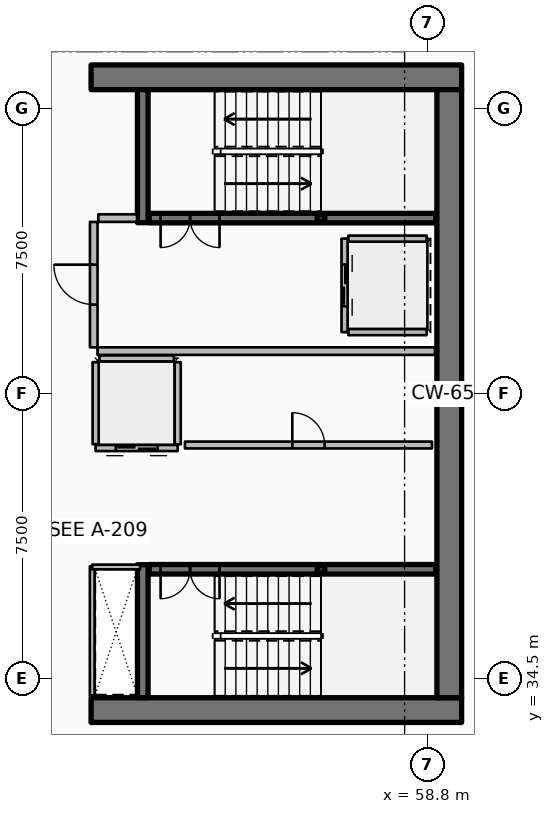
"""IFC4 building model, lengths in metres.
Left out: names, types, materials, properties, quantities, classifications, styles, units other than length and angle.
Written with IfcOpenShell. Run it as: python <this file> out.ifc"""

import sys

from ifc_helpers import new_model, si_unit, direction, frame, frame_2d, origin, origin_2d, place, context, subcontext, project, spatial, rectangle, hollow_rectangle, extrude, element, fill, save


model = new_model("IFC4")
c1 = context("Model", 3, precision=1e-05, world=origin(), true_north=direction((0.0, 1.0)))
c2 = subcontext(c1, "Body", "Model", "MODEL_VIEW")
j1 = project(units=[si_unit("LENGTHUNIT", "METRE"), si_unit("PLANEANGLEUNIT", "RADIAN")], contexts=[c1])
p1 = place(None, origin())
s1 = spatial("IfcSite", under=j1, at=p1, CompositionType="ELEMENT")
p2 = place(p1, origin())
s2 = spatial("IfcBuilding", under=s1, at=p2, CompositionType="ELEMENT")
p3 = place(p2, frame((0.0, 0.0, 214.05)))
s3 = spatial("IfcBuildingStorey", under=s2, at=p3, CompositionType="ELEMENT", Elevation=214.05)
for number, where, z_axis, x_axis in (
    (1, (49.95, 33.675, 0.0), (0.0, 0.0, 1.0), (1.0, 0.0, 0.0)),
    (2, (49.95, 50.325, 0.0), (0.0, 0.0, 1.0), (1.0, 0.0, 0.0)),
):
    element("IfcWall", number, at=place(p3, frame(where, z_axis=z_axis, x_axis=x_axis)), inside=s3, PredefinedType="SHEAR", context=c2, shape_type="SweptSolid", body=[
        extrude(rectangle(XDim=9.75, YDim=0.65, at=frame_2d((4.875, 0.0))), origin(), (0.0, 0.0, 1.0), 3.75),
    ])
p4 = place(p3, frame((59.375, 34.0, 0.0), z_axis=(0.0, 0.0, 1.0), x_axis=(0.0, 1.0, 0.0)))
e3 = element("IfcWall", 3, at=p4, inside=s3, PredefinedType="SHEAR", context=c2, shape_type="SweptSolid", body=[
    extrude(rectangle(XDim=16.0, YDim=0.65, at=frame_2d((8.0, 0.0))), origin(), (0.0, 0.0, 1.0), 3.75),
])
for number, where, z_axis, x_axis in (
    (4, (51.31, 46.5, 0.0), (0.0, 0.0, 1.0), (0.0, 1.0, 0.0)),
    (5, (51.31, 34.0, 0.0), (0.0, 0.0, 1.0), (0.0, 1.0, 0.0)),
):
    element("IfcWall", number, at=place(p3, frame(where, z_axis=z_axis, x_axis=x_axis)), inside=s3, PredefinedType="SHEAR", context=c2, shape_type="SweptSolid", body=[
        extrude(rectangle(XDim=3.5, YDim=0.28, at=frame_2d((1.75, 0.0))), origin(), (0.0, 0.0, 1.0), 3.75),
    ])
for number, where, z_axis, x_axis in (
    (6, (56.0, 46.62, 0.0), (0.0, 0.0, 1.0), (1.0, 0.0, 0.0)),
    (7, (56.0, 37.38, 0.0), (0.0, 0.0, 1.0), (1.0, 0.0, 0.0)),
):
    element("IfcColumn", number, at=place(p3, frame(where, z_axis=z_axis, x_axis=x_axis)), inside=s3, PredefinedType="COLUMN", context=c2, shape_type="SweptSolid", body=[
        extrude(hollow_rectangle(XDim=0.2, YDim=0.2, WallThickness=0.01, InnerFilletRadius=0.01, OuterFilletRadius=0.02, at=origin_2d()), origin(), (0.0, 0.0, 1.0), 1.67),
    ])
p5 = place(p3, frame((51.48, 46.62, 0.0), z_axis=(0.0, 0.0, 1.0), x_axis=(1.0, 0.0, 0.0)))
e8 = element("IfcWall", 8, at=p5, inside=s3, PredefinedType="SOLIDWALL", context=c2, shape_type="SweptSolid", body=[
    extrude(rectangle(XDim=7.54, YDim=0.25, at=frame_2d((3.77, 0.0))), origin(), (0.0, 0.0, 1.0), 3.5),
])
p6 = place(p5, frame((0.3, 0.0, 0.0)))
e9 = element("IfcOpeningElement", 9, at=p6, cuts=e8, PredefinedType="OPENING", context=c2, shape_type="SweptSolid", body=[
    extrude(rectangle(XDim=1.55, YDim=2.15, at=frame_2d((0.775, 1.075))), frame((0.0, 0.135, 0.0), z_axis=(0.0, -1.0, 0.0), x_axis=(1.0, 0.0, 0.0)), (0.0, 0.0, 1.0), 0.27),
])
p7 = place(p3, frame((51.48, 37.38, 0.0), z_axis=(0.0, 0.0, 1.0), x_axis=(1.0, 0.0, 0.0)))
e10 = element("IfcWall", 10, at=p7, inside=s3, PredefinedType="SOLIDWALL", context=c2, shape_type="SweptSolid", body=[
    extrude(rectangle(XDim=7.54, YDim=0.25, at=frame_2d((3.77, 0.0))), origin(), (0.0, 0.0, 1.0), 3.5),
])
p8 = place(p7, frame((0.3, 0.0, 0.0)))
e11 = element("IfcOpeningElement", 11, at=p8, cuts=e10, PredefinedType="OPENING", context=c2, shape_type="SweptSolid", body=[
    extrude(rectangle(XDim=1.55, YDim=2.15, at=frame_2d((0.775, 1.075))), frame((0.0, 0.135, 0.0), z_axis=(0.0, -1.0, 0.0), x_axis=(1.0, 0.0, 0.0)), (0.0, 0.0, 1.0), 0.27),
])
p9 = place(p3, frame((56.62, 46.08, 0.0), z_axis=(0.0, 0.0, 1.0), x_axis=(0.0, -1.0, 0.0)))
e12 = element("IfcWall", 12, at=p9, inside=s3, PredefinedType="PARTITIONING", context=c2, shape_type="SweptSolid", body=[
    extrude(rectangle(XDim=2.46, YDim=0.16, at=frame_2d((1.23, 0.0))), origin(), (0.0, 0.0, 1.0), 3.5),
])
p10 = place(p9, frame((0.68, 0.0, 0.0)))
e13 = element("IfcOpeningElement", 13, at=p10, cuts=e12, PredefinedType="OPENING", context=c2, shape_type="SweptSolid", body=[
    extrude(rectangle(XDim=1.1, YDim=2.1, at=frame_2d((0.55, 1.05))), frame((0.0, 0.09, 0.0), z_axis=(0.0, -1.0, 0.0), x_axis=(1.0, 0.0, 0.0)), (0.0, 0.0, 1.0), 0.18),
])
for number, where, z_axis, x_axis in (
    (14, (56.72, 46.08, 0.0), (0.0, 0.0, 1.0), (1.0, 0.0, 0.0)),
    (15, (56.72, 43.62, 0.0), (0.0, 0.0, 1.0), (1.0, 0.0, 0.0)),
):
    element("IfcWall", number, at=place(p3, frame(where, z_axis=z_axis, x_axis=x_axis)), inside=s3, PredefinedType="PARTITIONING", context=c2, shape_type="SweptSolid", body=[
        extrude(rectangle(XDim=2.06, YDim=0.16, at=frame_2d((1.03, 0.0))), origin(), (0.0, 0.0, 1.0), 3.5),
    ])
p11 = place(p3, frame((52.23, 40.57, 0.0), z_axis=(0.0, 0.0, 1.0), x_axis=(-1.0, 0.0, 0.0)))
e16 = element("IfcWall", 16, at=p11, inside=s3, PredefinedType="PARTITIONING", context=c2, shape_type="SweptSolid", body=[
    extrude(rectangle(XDim=2.16, YDim=0.16, at=frame_2d((1.08, 0.0))), origin(), (0.0, 0.0, 1.0), 3.5),
])
p12 = place(p11, frame((0.53, 0.0, 0.0)))
e17 = element("IfcOpeningElement", 17, at=p12, cuts=e16, PredefinedType="OPENING", context=c2, shape_type="SweptSolid", body=[
    extrude(rectangle(XDim=1.1, YDim=2.1, at=frame_2d((0.55, 1.05))), frame((0.0, 0.09, 0.0), z_axis=(0.0, -1.0, 0.0), x_axis=(1.0, 0.0, 0.0)), (0.0, 0.0, 1.0), 0.18),
])
for number, where, z_axis, x_axis in (
    (18, (52.23, 40.67, 0.0), (0.0, 0.0, 1.0), (0.0, 1.0, 0.0)),
    (19, (50.07, 40.67, 0.0), (0.0, 0.0, 1.0), (0.0, 1.0, 0.0)),
):
    element("IfcWall", number, at=place(p3, frame(where, z_axis=z_axis, x_axis=x_axis)), inside=s3, PredefinedType="PARTITIONING", context=c2, shape_type="SweptSolid", body=[
        extrude(rectangle(XDim=2.16, YDim=0.16, at=frame_2d((1.08, 0.0))), origin(), (0.0, 0.0, 1.0), 3.5),
    ])
p13 = place(p3, frame((50.17, 42.93, 0.0), z_axis=(0.0, 0.0, 1.0), x_axis=(1.0, 0.0, 0.0)))
e20 = element("IfcWall", 20, at=p13, inside=s3, PredefinedType="PARTITIONING", context=c2, shape_type="SweptSolid", body=[
    extrude(rectangle(XDim=1.96, YDim=0.16, at=frame_2d((0.98, 0.0))), origin(), (0.0, 0.0, 1.0), 3.5),
])
p14 = place(p3, frame((52.42, 40.65, 0.0), z_axis=(0.0, 0.0, 1.0), x_axis=(1.0, 0.0, 0.0)))
e21 = element("IfcWall", 21, at=p14, inside=s3, PredefinedType="PARTITIONING", context=c2, shape_type="SweptSolid", body=[
    extrude(rectangle(XDim=6.5, YDim=0.18, at=frame_2d((3.25, 0.0))), origin(), (0.0, 0.0, 1.0), 3.5),
])
p15 = place(p14, frame((2.825, 0.0, 0.0)))
e22 = element("IfcOpeningElement", 22, at=p15, cuts=e21, PredefinedType="OPENING", context=c2, shape_type="SweptSolid", body=[
    extrude(rectangle(XDim=0.85, YDim=2.06, at=frame_2d((0.425, 1.03))), frame((0.0, 0.1, 0.0), z_axis=(0.0, -1.0, 0.0), x_axis=(1.0, 0.0, 0.0)), (0.0, 0.0, 1.0), 0.2),
])
p16 = place(p3, frame((50.12, 43.12, 0.0), z_axis=(0.0, 0.0, 1.0), x_axis=(1.0, 0.0, 0.0)))
e23 = element("IfcWall", 23, at=p16, inside=s3, PredefinedType="PARTITIONING", context=c2, shape_type="SweptSolid", body=[
    extrude(rectangle(XDim=8.88, YDim=0.2, at=frame_2d((4.44, 0.0))), origin(), (0.0, 0.0, 1.0), 3.5),
])
p17 = place(p3, frame((50.14, 46.62, 0.0), z_axis=(0.0, 0.0, 1.0), x_axis=(1.0, 0.0, 0.0)))
e24 = element("IfcWall", 24, at=p17, inside=s3, PredefinedType="PARTITIONING", context=c2, shape_type="SweptSolid", body=[
    extrude(rectangle(XDim=1.02, YDim=0.2, at=frame_2d((0.51, 0.0))), origin(), (0.0, 0.0, 1.0), 3.5),
])
p18 = place(p3, frame((50.02, 43.22, 0.0), z_axis=(0.0, 0.0, 1.0), x_axis=(0.0, 1.0, 0.0)))
e25 = element("IfcWall", 25, at=p18, inside=s3, PredefinedType="PARTITIONING", context=c2, shape_type="SweptSolid", body=[
    extrude(rectangle(XDim=3.3, YDim=0.2, at=frame_2d((1.65, 0.0))), origin(), (0.0, 0.0, 1.0), 3.5),
])
p19 = place(p18, frame((1.125, 0.0, 0.0)))
e26 = element("IfcOpeningElement", 26, at=p19, cuts=e25, PredefinedType="OPENING", context=c2, shape_type="SweptSolid", body=[
    extrude(rectangle(XDim=1.05, YDim=2.1, at=frame_2d((0.525, 1.05))), frame((0.0, 0.11, 0.0), z_axis=(0.0, -1.0, 0.0), x_axis=(1.0, 0.0, 0.0)), (0.0, 0.0, 1.0), 0.22),
])
p20 = place(p3, frame((49.98, 34.06, 0.0), z_axis=(0.0, 0.0, 1.0), x_axis=(0.0, 1.0, 0.0)))
e27 = element("IfcWall", 27, at=p20, inside=s3, PredefinedType="PARTITIONING", context=c2, shape_type="SweptSolid", body=[
    extrude(rectangle(XDim=3.4, YDim=0.125, at=frame_2d((1.7, 0.0))), origin(), (0.0, 0.0, 1.0), 2.94),
])
p21 = place(p3, frame((49.98, 37.44, 0.0), z_axis=(0.0, 0.0, 1.0), x_axis=(1.0, 0.0, 0.0)))
e28 = element("IfcWall", 28, at=p21, inside=s3, PredefinedType="PARTITIONING", context=c2, shape_type="SweptSolid", body=[
    extrude(rectangle(XDim=1.26, YDim=0.125, at=frame_2d((0.63, 0.0))), origin(), (0.0, 0.0, 1.0), 2.94),
])
p22 = place(p6, origin())
e29 = element("IfcDoor", 29, at=p22, inside=s3, OperationType="DOUBLE_DOOR_SINGLE_SWING", PredefinedType="DOOR", context=c2, shape_type="SweptSolid", body=[
    extrude(rectangle(XDim=1.55, YDim=2.15, at=frame_2d((0.775, 1.075))), frame((0.0, 0.025, 0.0), z_axis=(0.0, -1.0, 0.0), x_axis=(1.0, 0.0, 0.0)), (0.0, 0.0, 1.0), 0.05),
])
fill(e9, e29)
p23 = place(p8, origin())
e30 = element("IfcDoor", 30, at=p23, inside=s3, OperationType="DOUBLE_DOOR_SINGLE_SWING", PredefinedType="DOOR", context=c2, shape_type="SweptSolid", body=[
    extrude(rectangle(XDim=1.55, YDim=2.15, at=frame_2d((0.775, 1.075))), frame((0.0, 0.025, 0.0), z_axis=(0.0, -1.0, 0.0), x_axis=(1.0, 0.0, 0.0)), (0.0, 0.0, 1.0), 0.05),
])
fill(e11, e30)
p24 = place(p10, origin())
e31 = element("IfcDoor", 31, at=p24, inside=s3, OperationType="DOUBLE_DOOR_SLIDING", PredefinedType="DOOR", context=c2, shape_type="SweptSolid", body=[
    extrude(rectangle(XDim=1.1, YDim=2.1, at=frame_2d((0.55, 1.05))), frame((0.0, 0.025, 0.0), z_axis=(0.0, -1.0, 0.0), x_axis=(1.0, 0.0, 0.0)), (0.0, 0.0, 1.0), 0.05),
])
fill(e13, e31)
p25 = place(p12, origin())
e32 = element("IfcDoor", 32, at=p25, inside=s3, OperationType="DOUBLE_DOOR_SLIDING", PredefinedType="DOOR", context=c2, shape_type="SweptSolid", body=[
    extrude(rectangle(XDim=1.1, YDim=2.1, at=frame_2d((0.55, 1.05))), frame((0.0, 0.025, 0.0), z_axis=(0.0, -1.0, 0.0), x_axis=(1.0, 0.0, 0.0)), (0.0, 0.0, 1.0), 0.05),
])
fill(e17, e32)
p26 = place(p15, origin())
e33 = element("IfcDoor", 33, at=p26, inside=s3, OperationType="SINGLE_SWING_LEFT", PredefinedType="DOOR", context=c2, shape_type="SweptSolid", body=[
    extrude(rectangle(XDim=0.85, YDim=2.06, at=frame_2d((0.425, 1.03))), frame((0.0, 0.025, 0.0), z_axis=(0.0, -1.0, 0.0), x_axis=(1.0, 0.0, 0.0)), (0.0, 0.0, 1.0), 0.05),
])
fill(e22, e33)
p27 = place(p19, origin())
e34 = element("IfcDoor", 34, at=p27, inside=s3, OperationType="SINGLE_SWING_RIGHT", PredefinedType="DOOR", context=c2, shape_type="SweptSolid", body=[
    extrude(rectangle(XDim=1.05, YDim=2.1, at=frame_2d((0.525, 1.05))), frame((0.0, 0.025, 0.0), z_axis=(0.0, -1.0, 0.0), x_axis=(1.0, 0.0, 0.0)), (0.0, 0.0, 1.0), 0.05),
])
fill(e26, e34)
save(model, sys.argv[1])
